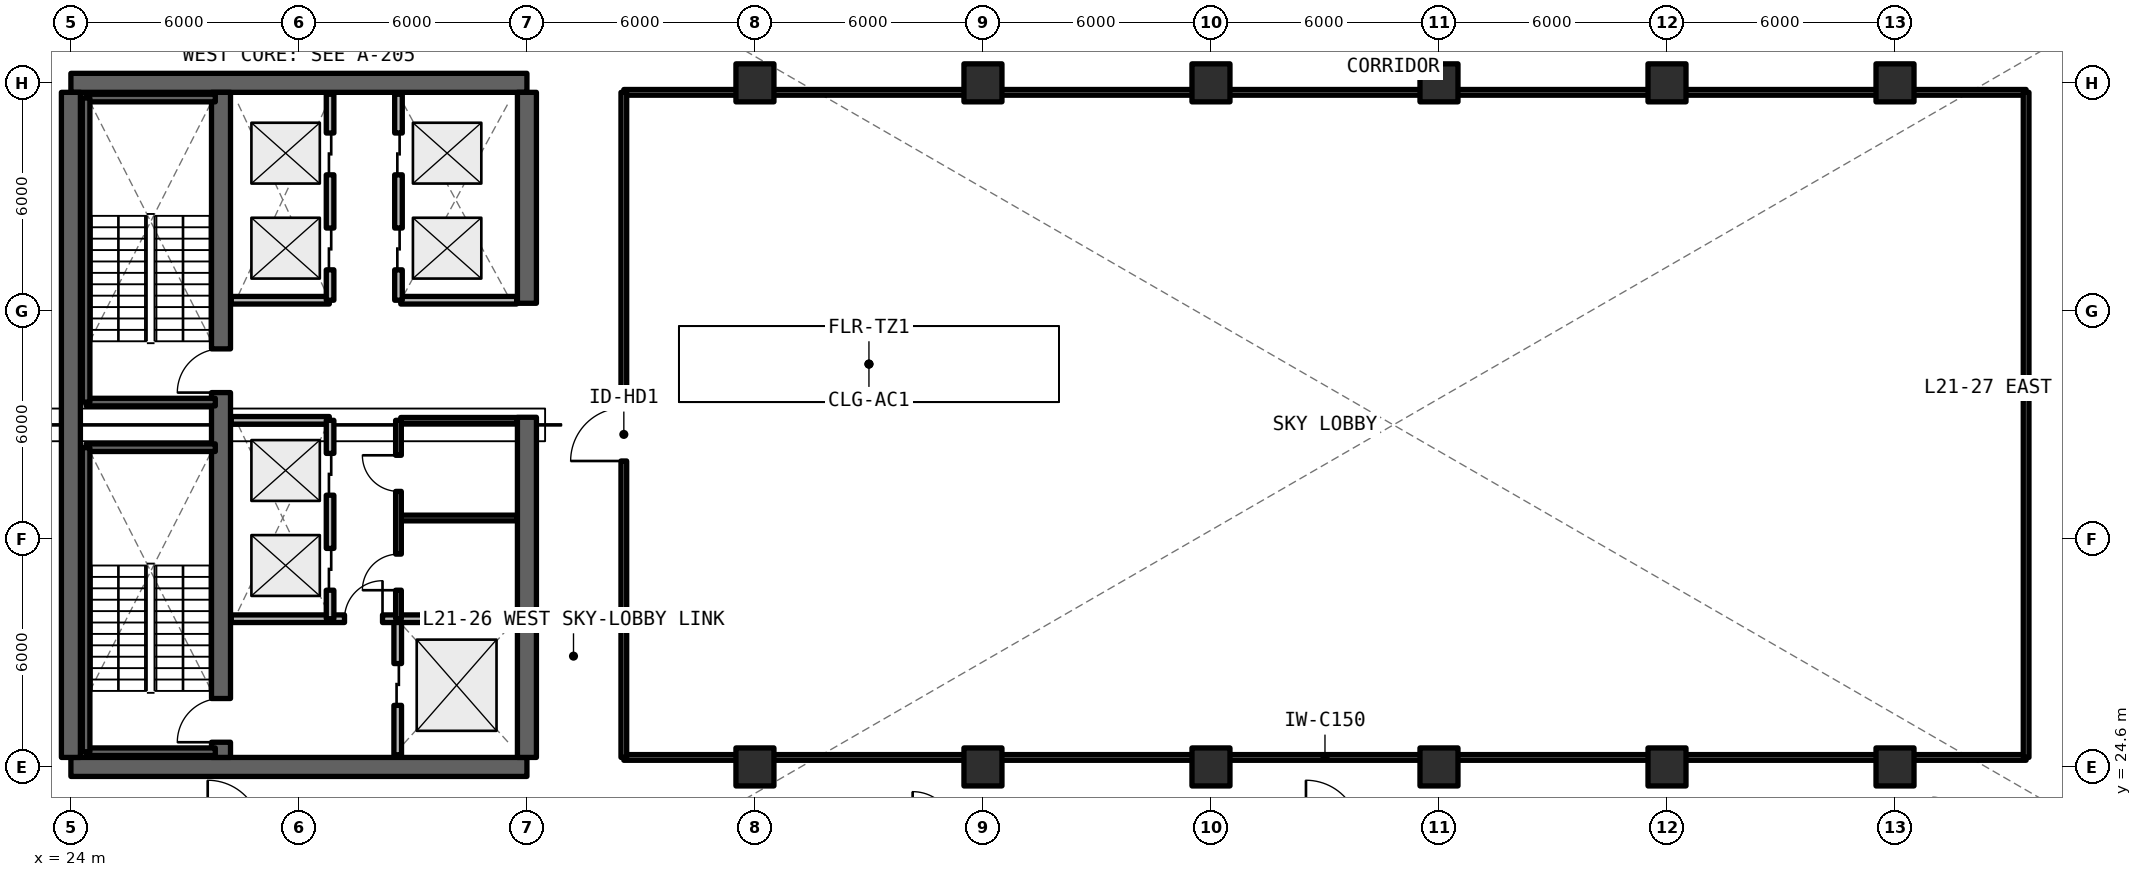
"""IFC4 building model, lengths in metres.
Left out: names, types, materials, properties, quantities, classifications, styles, units other than length and angle.
Written with IfcOpenShell. Run it as: python <this file> out.ifc"""

import sys

from ifc_helpers import new_model, si_unit, direction, frame, frame_2d, origin, origin_2d, place, context, subcontext, project, spatial, rectangle, extrude, element, fill, save


model = new_model("IFC4")
c1 = context("Model", 3, precision=1e-05, world=origin(), true_north=direction((0.0, 1.0)))
c2 = subcontext(c1, "Body", "Model", "MODEL_VIEW")
j1 = project(units=[si_unit("LENGTHUNIT", "METRE"), si_unit("PLANEANGLEUNIT", "RADIAN")], contexts=[c1])
p1 = place(None, origin())
s1 = spatial("IfcSite", under=j1, at=p1, CompositionType="ELEMENT")
p2 = place(p1, origin())
s2 = spatial("IfcBuilding", under=s1, at=p2, CompositionType="ELEMENT")
p3 = place(p2, frame((0.0, 0.0, 78.21)))
s3 = spatial("IfcBuildingStorey", under=s2, at=p3, CompositionType="ELEMENT", Elevation=78.21)
for number, where, z_axis, x_axis in (
    (1, (24.0, 24.6, 0.0), (0.0, 0.0, 1.0), (1.0, 0.0, 0.0)),
    (2, (36.0, 42.6, 0.0), (0.0, 0.0, 1.0), (-1.0, 0.0, 0.0)),
):
    element("IfcWall", number, at=place(p3, frame(where, z_axis=z_axis, x_axis=x_axis)), inside=s3, PredefinedType="SHEAR", context=c2, shape_type="SweptSolid", body=[
        extrude(rectangle(XDim=12.0, YDim=0.5, at=frame_2d((6.0, 0.0))), origin(), (0.0, 0.0, 1.0), 3.96),
    ])
p4 = place(p3, frame((24.0, 24.85, 0.0), z_axis=(0.0, 0.0, 1.0), x_axis=(0.0, 1.0, 0.0)))
e3 = element("IfcWall", 3, at=p4, inside=s3, PredefinedType="SHEAR", context=c2, shape_type="SweptSolid", body=[
    extrude(rectangle(XDim=17.5, YDim=0.5, at=frame_2d((8.75, 0.0))), origin(), (0.0, 0.0, 1.0), 3.96),
])
p5 = place(p3, frame((36.0, 24.85, 0.0), z_axis=(0.0, 0.0, 1.0), x_axis=(0.0, 1.0, 0.0)))
e4 = element("IfcWall", 4, at=p5, inside=s3, PredefinedType="SHEAR", context=c2, shape_type="SweptSolid", body=[
    extrude(rectangle(XDim=8.95, YDim=0.5, at=frame_2d((4.475, 0.0))), origin(), (0.0, 0.0, 1.0), 3.96),
])
p6 = place(p3, frame((36.0, 36.8, 0.0), z_axis=(0.0, 0.0, 1.0), x_axis=(0.0, 1.0, 0.0)))
e5 = element("IfcWall", 5, at=p6, inside=s3, PredefinedType="SHEAR", context=c2, shape_type="SweptSolid", body=[
    extrude(rectangle(XDim=5.55, YDim=0.5, at=frame_2d((2.775, 0.0))), origin(), (0.0, 0.0, 1.0), 3.96),
])
p7 = place(p3, frame((27.95, 24.85, 0.0), z_axis=(0.0, 0.0, 1.0), x_axis=(0.0, 1.0, 0.0)))
e6 = element("IfcWall", 6, at=p7, inside=s3, PredefinedType="SHEAR", context=c2, shape_type="SweptSolid", body=[
    extrude(rectangle(XDim=17.5, YDim=0.5, at=frame_2d((8.75, 0.0))), origin(), (0.0, 0.0, 1.0), 3.96),
])
p8 = place(p7, frame((0.4, 0.0, 0.0)))
e7 = element("IfcOpeningElement", 7, at=p8, cuts=e6, PredefinedType="OPENING", context=c2, shape_type="SweptSolid", body=[
    extrude(rectangle(XDim=1.15, YDim=2.15, at=frame_2d((0.575, 1.075))), frame((0.0, 0.26, 0.0), z_axis=(0.0, -1.0, 0.0), x_axis=(1.0, 0.0, 0.0)), (0.0, 0.0, 1.0), 0.52),
])
p9 = place(p7, frame((9.6, 0.0, 0.0)))
e8 = element("IfcOpeningElement", 8, at=p9, cuts=e6, PredefinedType="OPENING", context=c2, shape_type="SweptSolid", body=[
    extrude(rectangle(XDim=1.15, YDim=2.15, at=frame_2d((0.575, 1.075))), frame((0.0, 0.26, 0.0), z_axis=(0.0, -1.0, 0.0), x_axis=(1.0, 0.0, 0.0)), (0.0, 0.0, 1.0), 0.52),
])
for number, where, z_axis, x_axis in (
    (9, (42.0, 24.6, 0.0), (0.0, 0.0, 1.0), (1.0, 0.0, 0.0)),
    (10, (42.0, 42.6, 0.0), (0.0, 0.0, 1.0), (1.0, 0.0, 0.0)),
    (11, (48.0, 24.6, 0.0), (0.0, 0.0, 1.0), (1.0, 0.0, 0.0)),
    (12, (48.0, 42.6, 0.0), (0.0, 0.0, 1.0), (1.0, 0.0, 0.0)),
    (13, (54.0, 24.6, 0.0), (0.0, 0.0, 1.0), (1.0, 0.0, 0.0)),
    (14, (54.0, 42.6, 0.0), (0.0, 0.0, 1.0), (1.0, 0.0, 0.0)),
    (15, (60.0, 24.6, 0.0), (0.0, 0.0, 1.0), (1.0, 0.0, 0.0)),
    (16, (60.0, 42.6, 0.0), (0.0, 0.0, 1.0), (1.0, 0.0, 0.0)),
    (17, (66.0, 24.6, 0.0), (0.0, 0.0, 1.0), (1.0, 0.0, 0.0)),
    (18, (66.0, 42.6, 0.0), (0.0, 0.0, 1.0), (1.0, 0.0, 0.0)),
    (19, (72.0, 24.6, 0.0), (0.0, 0.0, 1.0), (1.0, 0.0, 0.0)),
    (20, (72.0, 42.6, 0.0), (0.0, 0.0, 1.0), (1.0, 0.0, 0.0)),
):
    element("IfcColumn", number, at=place(p3, frame(where, z_axis=z_axis, x_axis=x_axis)), inside=s3, PredefinedType="COLUMN", context=c2, shape_type="SweptSolid", body=[
        extrude(rectangle(XDim=1.0, YDim=1.0, at=origin_2d()), origin(), (0.0, 0.0, 1.0), 3.96),
    ])
p10 = place(p3, frame((32.6, 24.92, 0.0), z_axis=(0.0, 0.0, 1.0), x_axis=(0.0, 1.0, 0.0)))
e21 = element("IfcWall", 21, at=p10, inside=s3, PredefinedType="SOLIDWALL", context=c2, shape_type="SweptSolid", body=[
    extrude(rectangle(XDim=3.58, YDim=0.2, at=frame_2d((1.79, 0.0))), origin(), (0.0, 0.0, 1.0), 2.96),
])
p11 = place(p10, frame((1.3, 0.0, 0.0)))
e22 = element("IfcOpeningElement", 22, at=p11, cuts=e21, PredefinedType="OPENING", context=c2, shape_type="SweptSolid", body=[
    extrude(rectangle(XDim=1.1, YDim=2.2, at=frame_2d((0.55, 1.1))), frame((0.0, 0.11, 0.0), z_axis=(0.0, -1.0, 0.0), x_axis=(1.0, 0.0, 0.0)), (0.0, 0.0, 1.0), 0.22),
])
p12 = place(p3, frame((28.22, 28.5, 0.0), z_axis=(0.0, 0.0, 1.0), x_axis=(1.0, 0.0, 0.0)))
e23 = element("IfcWall", 23, at=p12, inside=s3, PredefinedType="SOLIDWALL", context=c2, shape_type="SweptSolid", body=[
    extrude(rectangle(XDim=7.51, YDim=0.2, at=frame_2d((3.755, 0.0))), origin(), (0.0, 0.0, 1.0), 2.96),
])
p13 = place(p12, frame((2.98, 0.0, 0.0)))
e24 = element("IfcOpeningElement", 24, at=p13, cuts=e23, PredefinedType="OPENING", context=c2, shape_type="SweptSolid", body=[
    extrude(rectangle(XDim=1.0, YDim=2.15, at=frame_2d((0.5, 1.075))), frame((0.0, 0.11, 0.0), z_axis=(0.0, -1.0, 0.0), x_axis=(1.0, 0.0, 0.0)), (0.0, 0.0, 1.0), 0.22),
])
p14 = place(p3, frame((28.22, 33.72, 0.0), z_axis=(0.0, 0.0, 1.0), x_axis=(1.0, 0.0, 0.0)))
e25 = element("IfcWall", 25, at=p14, inside=s3, PredefinedType="SOLIDWALL", context=c2, shape_type="SweptSolid", body=[
    extrude(rectangle(XDim=2.58, YDim=0.2, at=frame_2d((1.29, 0.0))), origin(), (0.0, 0.0, 1.0), 2.96),
])
p15 = place(p3, frame((30.82, 28.5, 0.0), z_axis=(0.0, 0.0, 1.0), x_axis=(0.0, 1.0, 0.0)))
e26 = element("IfcWall", 26, at=p15, inside=s3, PredefinedType="SOLIDWALL", context=c2, shape_type="SweptSolid", body=[
    extrude(rectangle(XDim=5.22, YDim=0.2, at=frame_2d((2.61, 0.0))), origin(), (0.0, 0.0, 1.0), 2.96),
])
p16 = place(p15, frame((0.75, 0.0, 0.0)))
e27 = element("IfcOpeningElement", 27, at=p16, cuts=e26, PredefinedType="OPENING", context=c2, shape_type="SweptSolid", body=[
    extrude(rectangle(XDim=1.1, YDim=2.2, at=frame_2d((0.55, 1.1))), frame((0.0, 0.11, 0.0), z_axis=(0.0, -1.0, 0.0), x_axis=(1.0, 0.0, 0.0)), (0.0, 0.0, 1.0), 0.22),
])
p17 = place(p15, frame((3.25, 0.0, 0.0)))
e28 = element("IfcOpeningElement", 28, at=p17, cuts=e26, PredefinedType="OPENING", context=c2, shape_type="SweptSolid", body=[
    extrude(rectangle(XDim=1.1, YDim=2.2, at=frame_2d((0.55, 1.1))), frame((0.0, 0.11, 0.0), z_axis=(0.0, -1.0, 0.0), x_axis=(1.0, 0.0, 0.0)), (0.0, 0.0, 1.0), 0.22),
])
for number, where, z_axis, x_axis in (
    (29, (32.68, 31.15, 0.0), (0.0, 0.0, 1.0), (1.0, 0.0, 0.0)),
    (30, (32.68, 33.72, 0.0), (0.0, 0.0, 1.0), (1.0, 0.0, 0.0)),
):
    element("IfcWall", number, at=place(p3, frame(where, z_axis=z_axis, x_axis=x_axis)), inside=s3, PredefinedType="SOLIDWALL", context=c2, shape_type="SweptSolid", body=[
        extrude(rectangle(XDim=3.05, YDim=0.15, at=frame_2d((1.525, 0.0))), origin(), (0.0, 0.0, 1.0), 2.96),
    ])
p18 = place(p3, frame((32.62, 28.5, 0.0), z_axis=(0.0, 0.0, 1.0), x_axis=(0.0, 1.0, 0.0)))
e31 = element("IfcWall", 31, at=p18, inside=s3, PredefinedType="SOLIDWALL", context=c2, shape_type="SweptSolid", body=[
    extrude(rectangle(XDim=5.22, YDim=0.15, at=frame_2d((2.61, 0.0))), origin(), (0.0, 0.0, 1.0), 2.96),
])
p19 = place(p18, frame((0.75, 0.0, 0.0)))
e32 = element("IfcOpeningElement", 32, at=p19, cuts=e31, PredefinedType="OPENING", context=c2, shape_type="SweptSolid", body=[
    extrude(rectangle(XDim=0.95, YDim=2.15, at=frame_2d((0.475, 1.075))), frame((0.0, 0.085, 0.0), z_axis=(0.0, -1.0, 0.0), x_axis=(1.0, 0.0, 0.0)), (0.0, 0.0, 1.0), 0.17),
])
p20 = place(p18, frame((3.35, 0.0, 0.0)))
e33 = element("IfcOpeningElement", 33, at=p20, cuts=e31, PredefinedType="OPENING", context=c2, shape_type="SweptSolid", body=[
    extrude(rectangle(XDim=0.95, YDim=2.15, at=frame_2d((0.475, 1.075))), frame((0.0, 0.085, 0.0), z_axis=(0.0, -1.0, 0.0), x_axis=(1.0, 0.0, 0.0)), (0.0, 0.0, 1.0), 0.17),
])
p21 = place(p3, frame((28.22, 36.88, 0.0), z_axis=(0.0, 0.0, 1.0), x_axis=(1.0, 0.0, 0.0)))
e34 = element("IfcWall", 34, at=p21, inside=s3, PredefinedType="SOLIDWALL", context=c2, shape_type="SweptSolid", body=[
    extrude(rectangle(XDim=2.58, YDim=0.2, at=frame_2d((1.29, 0.0))), origin(), (0.0, 0.0, 1.0), 2.96),
])
p22 = place(p3, frame((30.82, 36.88, 0.0), z_axis=(0.0, 0.0, 1.0), x_axis=(0.0, 1.0, 0.0)))
e35 = element("IfcWall", 35, at=p22, inside=s3, PredefinedType="SOLIDWALL", context=c2, shape_type="SweptSolid", body=[
    extrude(rectangle(XDim=5.42, YDim=0.2, at=frame_2d((2.71, 0.0))), origin(), (0.0, 0.0, 1.0), 2.96),
])
p23 = place(p22, frame((0.8, 0.0, 0.0)))
e36 = element("IfcOpeningElement", 36, at=p23, cuts=e35, PredefinedType="OPENING", context=c2, shape_type="SweptSolid", body=[
    extrude(rectangle(XDim=1.1, YDim=2.2, at=frame_2d((0.55, 1.1))), frame((0.0, 0.11, 0.0), z_axis=(0.0, -1.0, 0.0), x_axis=(1.0, 0.0, 0.0)), (0.0, 0.0, 1.0), 0.22),
])
p24 = place(p22, frame((3.3, 0.0, 0.0)))
e37 = element("IfcOpeningElement", 37, at=p24, cuts=e35, PredefinedType="OPENING", context=c2, shape_type="SweptSolid", body=[
    extrude(rectangle(XDim=1.1, YDim=2.2, at=frame_2d((0.55, 1.1))), frame((0.0, 0.11, 0.0), z_axis=(0.0, -1.0, 0.0), x_axis=(1.0, 0.0, 0.0)), (0.0, 0.0, 1.0), 0.22),
])
p25 = place(p3, frame((32.68, 36.88, 0.0), z_axis=(0.0, 0.0, 1.0), x_axis=(1.0, 0.0, 0.0)))
e38 = element("IfcWall", 38, at=p25, inside=s3, PredefinedType="SOLIDWALL", context=c2, shape_type="SweptSolid", body=[
    extrude(rectangle(XDim=3.05, YDim=0.2, at=frame_2d((1.525, 0.0))), origin(), (0.0, 0.0, 1.0), 2.96),
])
p26 = place(p3, frame((32.62, 36.88, 0.0), z_axis=(0.0, 0.0, 1.0), x_axis=(0.0, 1.0, 0.0)))
e39 = element("IfcWall", 39, at=p26, inside=s3, PredefinedType="SOLIDWALL", context=c2, shape_type="SweptSolid", body=[
    extrude(rectangle(XDim=5.42, YDim=0.2, at=frame_2d((2.71, 0.0))), origin(), (0.0, 0.0, 1.0), 2.96),
])
p27 = place(p26, frame((0.8, 0.0, 0.0)))
e40 = element("IfcOpeningElement", 40, at=p27, cuts=e39, PredefinedType="OPENING", context=c2, shape_type="SweptSolid", body=[
    extrude(rectangle(XDim=1.1, YDim=2.2, at=frame_2d((0.55, 1.1))), frame((0.0, 0.11, 0.0), z_axis=(0.0, -1.0, 0.0), x_axis=(1.0, 0.0, 0.0)), (0.0, 0.0, 1.0), 0.22),
])
p28 = place(p26, frame((3.3, 0.0, 0.0)))
e41 = element("IfcOpeningElement", 41, at=p28, cuts=e39, PredefinedType="OPENING", context=c2, shape_type="SweptSolid", body=[
    extrude(rectangle(XDim=1.1, YDim=2.2, at=frame_2d((0.55, 1.1))), frame((0.0, 0.11, 0.0), z_axis=(0.0, -1.0, 0.0), x_axis=(1.0, 0.0, 0.0)), (0.0, 0.0, 1.0), 0.22),
])
for number, where, z_axis, x_axis in (
    (42, (38.55, 24.85, 0.0), (0.0, 0.0, 1.0), (1.0, 0.0, 0.0)),
    (43, (38.55, 42.35, 0.0), (0.0, 0.0, 1.0), (1.0, 0.0, 0.0)),
):
    element("IfcWall", number, at=place(p3, frame(where, z_axis=z_axis, x_axis=x_axis)), inside=s3, PredefinedType="SOLIDWALL", context=c2, shape_type="SweptSolid", body=[
        extrude(rectangle(XDim=36.9, YDim=0.15, at=frame_2d((18.45, 0.0))), origin(), (0.0, 0.0, 1.0), 2.96),
    ])
p29 = place(p3, frame((38.55, 24.85, 0.0), z_axis=(0.0, 0.0, 1.0), x_axis=(0.0, 1.0, 0.0)))
e44 = element("IfcWall", 44, at=p29, inside=s3, PredefinedType="SOLIDWALL", context=c2, shape_type="SweptSolid", body=[
    extrude(rectangle(XDim=17.5, YDim=0.15, at=frame_2d((8.75, 0.0))), origin(), (0.0, 0.0, 1.0), 2.96),
])
p30 = place(p29, frame((7.8, 0.0, 0.0)))
e45 = element("IfcOpeningElement", 45, at=p30, cuts=e44, PredefinedType="OPENING", context=c2, shape_type="SweptSolid", body=[
    extrude(rectangle(XDim=1.4, YDim=2.15, at=frame_2d((0.7, 1.075))), frame((0.0, 0.085, 0.0), z_axis=(0.0, -1.0, 0.0), x_axis=(1.0, 0.0, 0.0)), (0.0, 0.0, 1.0), 0.17),
])
p31 = place(p3, frame((75.45, 24.85, 0.0), z_axis=(0.0, 0.0, 1.0), x_axis=(0.0, 1.0, 0.0)))
e46 = element("IfcWall", 46, at=p31, inside=s3, PredefinedType="SOLIDWALL", context=c2, shape_type="SweptSolid", body=[
    extrude(rectangle(XDim=17.5, YDim=0.15, at=frame_2d((8.75, 0.0))), origin(), (0.0, 0.0, 1.0), 2.96),
])
for number, where, z_axis, x_axis in (
    (47, (24.4, 25.0, 0.0), (0.0, 0.0, 1.0), (1.0, 0.0, 0.0)),
    (48, (27.8, 33.0, 0.0), (0.0, 0.0, 1.0), (-1.0, 0.0, 0.0)),
):
    element("IfcWall", number, at=place(p3, frame(where, z_axis=z_axis, x_axis=x_axis)), inside=s3, PredefinedType="SOLIDWALL", context=c2, shape_type="SweptSolid", body=[
        extrude(rectangle(XDim=3.4, YDim=0.2, at=frame_2d((1.7, 0.0))), origin(), (0.0, 0.0, 1.0), 3.96),
    ])
p32 = place(p3, frame((24.4, 33.0, 0.0), z_axis=(0.0, 0.0, 1.0), x_axis=(0.0, -1.0, 0.0)))
e49 = element("IfcWall", 49, at=p32, inside=s3, PredefinedType="SOLIDWALL", context=c2, shape_type="SweptSolid", body=[
    extrude(rectangle(XDim=8.0, YDim=0.2, at=frame_2d((4.0, 0.0))), origin(), (0.0, 0.0, 1.0), 3.96),
])
for number, where, z_axis, x_axis in (
    (50, (24.4, 34.2, 0.0), (0.0, 0.0, 1.0), (1.0, 0.0, 0.0)),
    (51, (27.8, 42.2, 0.0), (0.0, 0.0, 1.0), (-1.0, 0.0, 0.0)),
):
    element("IfcWall", number, at=place(p3, frame(where, z_axis=z_axis, x_axis=x_axis)), inside=s3, PredefinedType="SOLIDWALL", context=c2, shape_type="SweptSolid", body=[
        extrude(rectangle(XDim=3.4, YDim=0.2, at=frame_2d((1.7, 0.0))), origin(), (0.0, 0.0, 1.0), 3.96),
    ])
p33 = place(p3, frame((24.4, 42.2, 0.0), z_axis=(0.0, 0.0, 1.0), x_axis=(0.0, -1.0, 0.0)))
e52 = element("IfcWall", 52, at=p33, inside=s3, PredefinedType="SOLIDWALL", context=c2, shape_type="SweptSolid", body=[
    extrude(rectangle(XDim=8.0, YDim=0.2, at=frame_2d((4.0, 0.0))), origin(), (0.0, 0.0, 1.0), 3.96),
])
p34 = place(p11, origin())
e53 = element("IfcDoor", 53, at=p34, inside=s3, OperationType="SLIDING_TO_LEFT", PredefinedType="DOOR", context=c2, shape_type="SweptSolid", body=[
    extrude(rectangle(XDim=1.1, YDim=2.2, at=frame_2d((0.55, 1.1))), frame((0.0, 0.025, 0.0), z_axis=(0.0, -1.0, 0.0), x_axis=(1.0, 0.0, 0.0)), (0.0, 0.0, 1.0), 0.05),
])
fill(e22, e53)
p35 = place(p13, origin())
e54 = element("IfcDoor", 54, at=p35, inside=s3, OperationType="SINGLE_SWING_RIGHT", PredefinedType="DOOR", context=c2, shape_type="SweptSolid", body=[
    extrude(rectangle(XDim=1.0, YDim=2.15, at=frame_2d((0.5, 1.075))), frame((0.0, 0.025, 0.0), z_axis=(0.0, -1.0, 0.0), x_axis=(1.0, 0.0, 0.0)), (0.0, 0.0, 1.0), 0.05),
])
fill(e24, e54)
p36 = place(p16, origin())
e55 = element("IfcDoor", 55, at=p36, inside=s3, OperationType="SLIDING_TO_LEFT", PredefinedType="DOOR", context=c2, shape_type="SweptSolid", body=[
    extrude(rectangle(XDim=1.1, YDim=2.2, at=frame_2d((0.55, 1.1))), frame((0.0, 0.025, 0.0), z_axis=(0.0, -1.0, 0.0), x_axis=(1.0, 0.0, 0.0)), (0.0, 0.0, 1.0), 0.05),
])
fill(e27, e55)
p37 = place(p17, origin())
e56 = element("IfcDoor", 56, at=p37, inside=s3, OperationType="SLIDING_TO_RIGHT", PredefinedType="DOOR", context=c2, shape_type="SweptSolid", body=[
    extrude(rectangle(XDim=1.1, YDim=2.2, at=frame_2d((0.55, 1.1))), frame((0.0, 0.025, 0.0), z_axis=(0.0, -1.0, 0.0), x_axis=(1.0, 0.0, 0.0)), (0.0, 0.0, 1.0), 0.05),
])
fill(e28, e56)
p38 = place(p19, origin())
e57 = element("IfcDoor", 57, at=p38, inside=s3, OperationType="SINGLE_SWING_LEFT", PredefinedType="DOOR", context=c2, shape_type="SweptSolid", body=[
    extrude(rectangle(XDim=0.95, YDim=2.15, at=frame_2d((0.475, 1.075))), frame((0.0, 0.025, 0.0), z_axis=(0.0, -1.0, 0.0), x_axis=(1.0, 0.0, 0.0)), (0.0, 0.0, 1.0), 0.05),
])
fill(e32, e57)
p39 = place(p20, origin())
e58 = element("IfcDoor", 58, at=p39, inside=s3, OperationType="SINGLE_SWING_RIGHT", PredefinedType="DOOR", context=c2, shape_type="SweptSolid", body=[
    extrude(rectangle(XDim=0.95, YDim=2.15, at=frame_2d((0.475, 1.075))), frame((0.0, 0.025, 0.0), z_axis=(0.0, -1.0, 0.0), x_axis=(1.0, 0.0, 0.0)), (0.0, 0.0, 1.0), 0.05),
])
fill(e33, e58)
p40 = place(p23, origin())
e59 = element("IfcDoor", 59, at=p40, inside=s3, OperationType="SLIDING_TO_LEFT", PredefinedType="DOOR", context=c2, shape_type="SweptSolid", body=[
    extrude(rectangle(XDim=1.1, YDim=2.2, at=frame_2d((0.55, 1.1))), frame((0.0, 0.025, 0.0), z_axis=(0.0, -1.0, 0.0), x_axis=(1.0, 0.0, 0.0)), (0.0, 0.0, 1.0), 0.05),
])
fill(e36, e59)
p41 = place(p24, origin())
e60 = element("IfcDoor", 60, at=p41, inside=s3, OperationType="SLIDING_TO_RIGHT", PredefinedType="DOOR", context=c2, shape_type="SweptSolid", body=[
    extrude(rectangle(XDim=1.1, YDim=2.2, at=frame_2d((0.55, 1.1))), frame((0.0, 0.025, 0.0), z_axis=(0.0, -1.0, 0.0), x_axis=(1.0, 0.0, 0.0)), (0.0, 0.0, 1.0), 0.05),
])
fill(e37, e60)
p42 = place(p27, origin())
e61 = element("IfcDoor", 61, at=p42, inside=s3, OperationType="SLIDING_TO_LEFT", PredefinedType="DOOR", context=c2, shape_type="SweptSolid", body=[
    extrude(rectangle(XDim=1.1, YDim=2.2, at=frame_2d((0.55, 1.1))), frame((0.0, 0.025, 0.0), z_axis=(0.0, -1.0, 0.0), x_axis=(1.0, 0.0, 0.0)), (0.0, 0.0, 1.0), 0.05),
])
fill(e40, e61)
p43 = place(p28, origin())
e62 = element("IfcDoor", 62, at=p43, inside=s3, OperationType="SLIDING_TO_RIGHT", PredefinedType="DOOR", context=c2, shape_type="SweptSolid", body=[
    extrude(rectangle(XDim=1.1, YDim=2.2, at=frame_2d((0.55, 1.1))), frame((0.0, 0.025, 0.0), z_axis=(0.0, -1.0, 0.0), x_axis=(1.0, 0.0, 0.0)), (0.0, 0.0, 1.0), 0.05),
])
fill(e41, e62)
p44 = place(p30, origin())
e63 = element("IfcDoor", 63, at=p44, inside=s3, OperationType="SINGLE_SWING_LEFT", PredefinedType="DOOR", context=c2, shape_type="SweptSolid", body=[
    extrude(rectangle(XDim=1.4, YDim=2.15, at=frame_2d((0.7, 1.075))), frame((0.0, 0.025, 0.0), z_axis=(0.0, -1.0, 0.0), x_axis=(1.0, 0.0, 0.0)), (0.0, 0.0, 1.0), 0.05),
])
fill(e45, e63)
p45 = place(p8, origin())
e64 = element("IfcDoor", 64, at=p45, inside=s3, OperationType="SINGLE_SWING_LEFT", PredefinedType="DOOR", context=c2, shape_type="SweptSolid", body=[
    extrude(rectangle(XDim=1.15, YDim=2.15, at=frame_2d((0.575, 1.075))), frame((0.0, 0.025, 0.0), z_axis=(0.0, -1.0, 0.0), x_axis=(1.0, 0.0, 0.0)), (0.0, 0.0, 1.0), 0.05),
])
fill(e7, e64)
p46 = place(p9, origin())
e65 = element("IfcDoor", 65, at=p46, inside=s3, OperationType="SINGLE_SWING_RIGHT", PredefinedType="DOOR", context=c2, shape_type="SweptSolid", body=[
    extrude(rectangle(XDim=1.15, YDim=2.15, at=frame_2d((0.575, 1.075))), frame((0.0, 0.025, 0.0), z_axis=(0.0, -1.0, 0.0), x_axis=(1.0, 0.0, 0.0)), (0.0, 0.0, 1.0), 0.05),
])
fill(e8, e65)
save(model, sys.argv[1])
